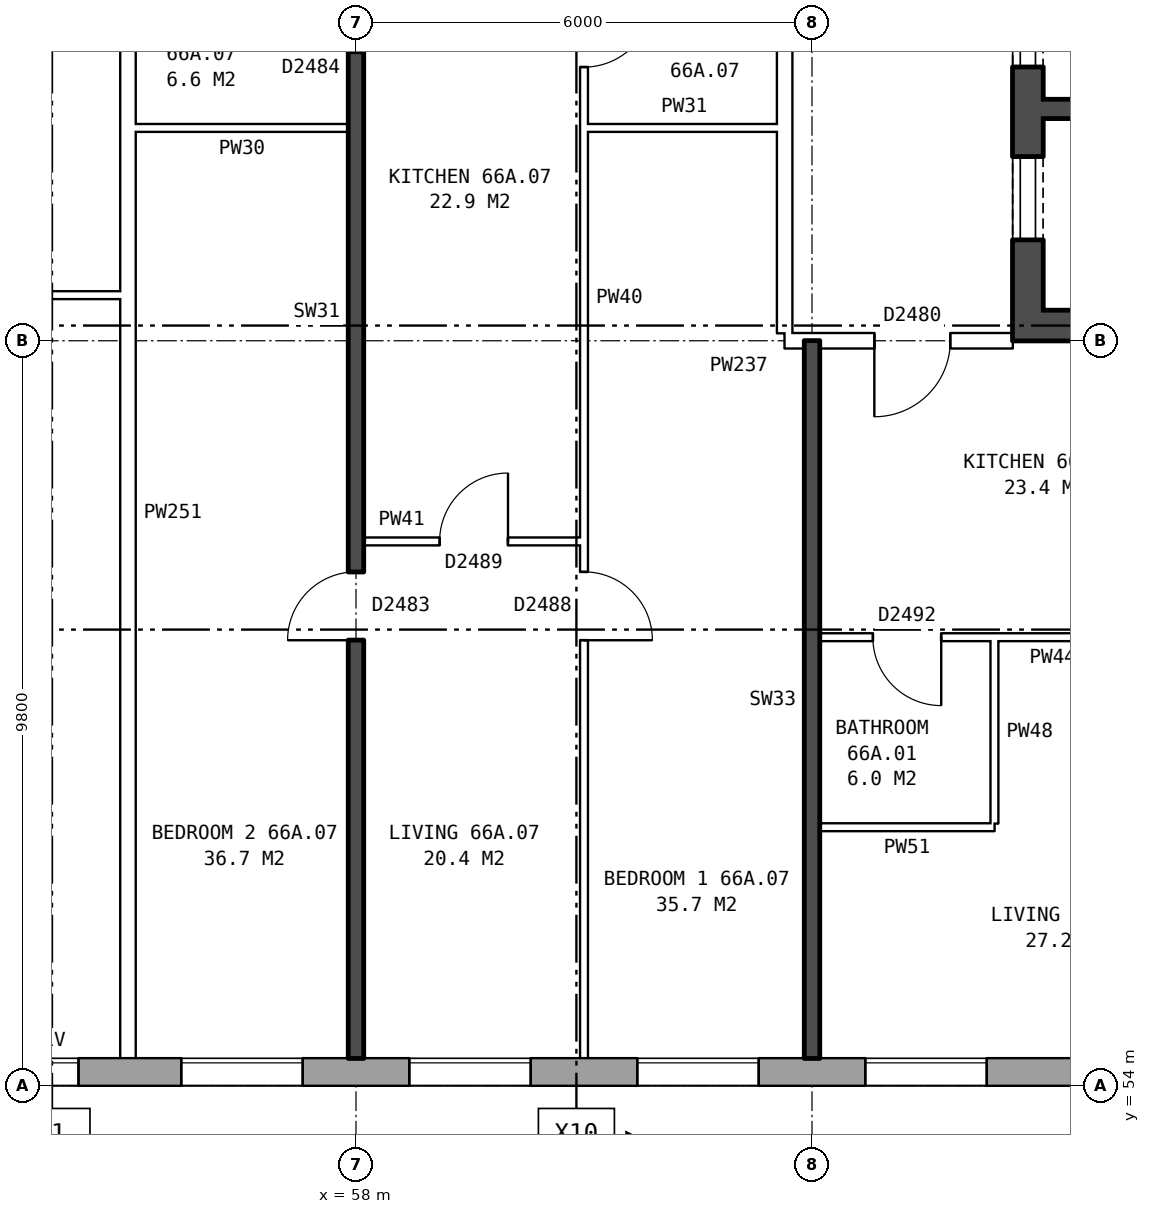
"""IFC4 building model, lengths in metres.
Left out: names, types, materials, properties, quantities, classifications, styles, units other than length and angle.
Written with IfcOpenShell. Run it as: python <this file> out.ifc"""

import sys

from ifc_helpers import new_model, si_unit, direction, frame, frame_2d, origin, place, context, subcontext, project, spatial, rectangle, extrude, element, fill, save


model = new_model("IFC4")
c1 = context("Model", 3, precision=1e-05, world=origin(), true_north=direction((0.0, 1.0)))
c2 = subcontext(c1, "Body", "Model", "MODEL_VIEW")
j1 = project(units=[si_unit("LENGTHUNIT", "METRE"), si_unit("PLANEANGLEUNIT", "RADIAN")], contexts=[c1])
p1 = place(None, origin())
s1 = spatial("IfcSite", under=j1, at=p1, CompositionType="ELEMENT")
p2 = place(p1, origin())
s2 = spatial("IfcBuilding", under=s1, at=p2, CompositionType="ELEMENT")
p3 = place(p2, frame((0.0, 0.0, 233.8)))
s3 = spatial("IfcBuildingStorey", under=s2, at=p3, CompositionType="ELEMENT", Elevation=233.8)
p4 = place(p3, frame((35.075, 54.18, 0.0), z_axis=(0.0, 0.0, 1.0), x_axis=(1.0, 0.0, 0.0)))
e1 = element("IfcWall", 1, at=p4, inside=s3, PredefinedType="STANDARD", context=c2, shape_type="SweptSolid", body=[
    extrude(rectangle(XDim=39.875, YDim=0.36, at=frame_2d((19.938, 0.0))), origin(), (0.0, 0.0, 1.0), 2.85),
])
p5 = place(p4, frame((2.625, 0.0, 0.8)))
e2 = element("IfcOpeningElement", 2, at=p5, cuts=e1, PredefinedType="OPENING", context=c2, shape_type="SweptSolid", body=[
    extrude(rectangle(XDim=1.6, YDim=1.8, at=frame_2d((0.8, 0.9))), frame((0.0, 0.19, 0.0), z_axis=(0.0, -1.0, 0.0), x_axis=(1.0, 0.0, 0.0)), (0.0, 0.0, 1.0), 0.38),
])
p6 = place(p4, frame((5.625, 0.0, 0.8)))
e3 = element("IfcOpeningElement", 3, at=p6, cuts=e1, PredefinedType="OPENING", context=c2, shape_type="SweptSolid", body=[
    extrude(rectangle(XDim=1.6, YDim=1.8, at=frame_2d((0.8, 0.9))), frame((0.0, 0.19, 0.0), z_axis=(0.0, -1.0, 0.0), x_axis=(1.0, 0.0, 0.0)), (0.0, 0.0, 1.0), 0.38),
])
p7 = place(p4, frame((8.625, 0.0, 0.8)))
e4 = element("IfcOpeningElement", 4, at=p7, cuts=e1, PredefinedType="OPENING", context=c2, shape_type="SweptSolid", body=[
    extrude(rectangle(XDim=1.6, YDim=1.8, at=frame_2d((0.8, 0.9))), frame((0.0, 0.19, 0.0), z_axis=(0.0, -1.0, 0.0), x_axis=(1.0, 0.0, 0.0)), (0.0, 0.0, 1.0), 0.38),
])
p8 = place(p4, frame((11.625, 0.0, 0.8)))
e5 = element("IfcOpeningElement", 5, at=p8, cuts=e1, PredefinedType="OPENING", context=c2, shape_type="SweptSolid", body=[
    extrude(rectangle(XDim=1.6, YDim=1.8, at=frame_2d((0.8, 0.9))), frame((0.0, 0.19, 0.0), z_axis=(0.0, -1.0, 0.0), x_axis=(1.0, 0.0, 0.0)), (0.0, 0.0, 1.0), 0.38),
])
p9 = place(p4, frame((14.625, 0.0, 0.8)))
e6 = element("IfcOpeningElement", 6, at=p9, cuts=e1, PredefinedType="OPENING", context=c2, shape_type="SweptSolid", body=[
    extrude(rectangle(XDim=1.6, YDim=1.8, at=frame_2d((0.8, 0.9))), frame((0.0, 0.19, 0.0), z_axis=(0.0, -1.0, 0.0), x_axis=(1.0, 0.0, 0.0)), (0.0, 0.0, 1.0), 0.38),
])
p10 = place(p4, frame((18.475, 0.0, 0.15)))
e7 = element("IfcOpeningElement", 7, at=p10, cuts=e1, PredefinedType="OPENING", context=c2, shape_type="SweptSolid", body=[
    extrude(rectangle(XDim=0.8, YDim=0.9, at=frame_2d((0.4, 0.45))), frame((0.0, 0.19, 0.0), z_axis=(0.0, -1.0, 0.0), x_axis=(1.0, 0.0, 0.0)), (0.0, 0.0, 1.0), 0.38),
])
p11 = place(p4, frame((20.625, 0.0, 0.8)))
e8 = element("IfcOpeningElement", 8, at=p11, cuts=e1, PredefinedType="OPENING", context=c2, shape_type="SweptSolid", body=[
    extrude(rectangle(XDim=1.6, YDim=1.8, at=frame_2d((0.8, 0.9))), frame((0.0, 0.19, 0.0), z_axis=(0.0, -1.0, 0.0), x_axis=(1.0, 0.0, 0.0)), (0.0, 0.0, 1.0), 0.38),
])
p12 = place(p4, frame((23.625, 0.0, 0.8)))
e9 = element("IfcOpeningElement", 9, at=p12, cuts=e1, PredefinedType="OPENING", context=c2, shape_type="SweptSolid", body=[
    extrude(rectangle(XDim=1.6, YDim=1.8, at=frame_2d((0.8, 0.9))), frame((0.0, 0.19, 0.0), z_axis=(0.0, -1.0, 0.0), x_axis=(1.0, 0.0, 0.0)), (0.0, 0.0, 1.0), 0.38),
])
p13 = place(p4, frame((26.625, 0.0, 0.8)))
e10 = element("IfcOpeningElement", 10, at=p13, cuts=e1, PredefinedType="OPENING", context=c2, shape_type="SweptSolid", body=[
    extrude(rectangle(XDim=1.6, YDim=1.8, at=frame_2d((0.8, 0.9))), frame((0.0, 0.19, 0.0), z_axis=(0.0, -1.0, 0.0), x_axis=(1.0, 0.0, 0.0)), (0.0, 0.0, 1.0), 0.38),
])
p14 = place(p4, frame((29.625, 0.0, 0.8)))
e11 = element("IfcOpeningElement", 11, at=p14, cuts=e1, PredefinedType="OPENING", context=c2, shape_type="SweptSolid", body=[
    extrude(rectangle(XDim=1.6, YDim=1.8, at=frame_2d((0.8, 0.9))), frame((0.0, 0.19, 0.0), z_axis=(0.0, -1.0, 0.0), x_axis=(1.0, 0.0, 0.0)), (0.0, 0.0, 1.0), 0.38),
])
p15 = place(p4, frame((32.625, 0.0, 0.8)))
e12 = element("IfcOpeningElement", 12, at=p15, cuts=e1, PredefinedType="OPENING", context=c2, shape_type="SweptSolid", body=[
    extrude(rectangle(XDim=1.6, YDim=1.8, at=frame_2d((0.8, 0.9))), frame((0.0, 0.19, 0.0), z_axis=(0.0, -1.0, 0.0), x_axis=(1.0, 0.0, 0.0)), (0.0, 0.0, 1.0), 0.38),
])
p16 = place(p4, frame((35.625, 0.0, 0.8)))
e13 = element("IfcOpeningElement", 13, at=p16, cuts=e1, PredefinedType="OPENING", context=c2, shape_type="SweptSolid", body=[
    extrude(rectangle(XDim=1.6, YDim=1.8, at=frame_2d((0.8, 0.9))), frame((0.0, 0.19, 0.0), z_axis=(0.0, -1.0, 0.0), x_axis=(1.0, 0.0, 0.0)), (0.0, 0.0, 1.0), 0.38),
])
p17 = place(p3, frame((66.84, 63.8, 0.0), z_axis=(0.0, 0.0, 1.0), x_axis=(0.0, 1.0, 0.0)))
e14 = element("IfcWall", 14, at=p17, inside=s3, PredefinedType="SHEAR", context=c2, shape_type="SweptSolid", body=[
    extrude(rectangle(XDim=12.4, YDim=0.4, at=frame_2d((6.2, 0.0))), origin(), (0.0, 0.0, 1.0), 2.85),
])
p18 = place(p17, frame((1.325, 0.0, 0.0)))
e15 = element("IfcOpeningElement", 15, at=p18, cuts=e14, PredefinedType="OPENING", context=c2, shape_type="SweptSolid", body=[
    extrude(rectangle(XDim=1.1, YDim=2.1, at=frame_2d((0.55, 1.05))), frame((0.0, 0.21, 0.0), z_axis=(0.0, -1.0, 0.0), x_axis=(1.0, 0.0, 0.0)), (0.0, 0.0, 1.0), 0.42),
])
p19 = place(p17, frame((3.6, 0.0, 0.0)))
e16 = element("IfcOpeningElement", 16, at=p19, cuts=e14, PredefinedType="OPENING", context=c2, shape_type="SweptSolid", body=[
    extrude(rectangle(XDim=1.1, YDim=2.1, at=frame_2d((0.55, 1.05))), frame((0.0, 0.21, 0.0), z_axis=(0.0, -1.0, 0.0), x_axis=(1.0, 0.0, 0.0)), (0.0, 0.0, 1.0), 0.42),
])
p20 = place(p17, frame((5.8, 0.0, 0.0)))
e17 = element("IfcOpeningElement", 17, at=p20, cuts=e14, PredefinedType="OPENING", context=c2, shape_type="SweptSolid", body=[
    extrude(rectangle(XDim=1.1, YDim=2.1, at=frame_2d((0.55, 1.05))), frame((0.0, 0.21, 0.0), z_axis=(0.0, -1.0, 0.0), x_axis=(1.0, 0.0, 0.0)), (0.0, 0.0, 1.0), 0.42),
])
p21 = place(p17, frame((8.0, 0.0, 0.0)))
e18 = element("IfcOpeningElement", 18, at=p21, cuts=e14, PredefinedType="OPENING", context=c2, shape_type="SweptSolid", body=[
    extrude(rectangle(XDim=1.1, YDim=2.1, at=frame_2d((0.55, 1.05))), frame((0.0, 0.21, 0.0), z_axis=(0.0, -1.0, 0.0), x_axis=(1.0, 0.0, 0.0)), (0.0, 0.0, 1.0), 0.42),
])
p22 = place(p17, frame((9.9, 0.0, 0.0)))
e19 = element("IfcOpeningElement", 19, at=p22, cuts=e14, PredefinedType="OPENING", context=c2, shape_type="SweptSolid", body=[
    extrude(rectangle(XDim=1.1, YDim=2.1, at=frame_2d((0.55, 1.05))), frame((0.0, 0.21, 0.0), z_axis=(0.0, -1.0, 0.0), x_axis=(1.0, 0.0, 0.0)), (0.0, 0.0, 1.0), 0.42),
])
p23 = place(p3, frame((67.04, 64.0, 0.0), z_axis=(0.0, 0.0, 1.0), x_axis=(1.0, 0.0, 0.0)))
e20 = element("IfcWall", 20, at=p23, inside=s3, PredefinedType="SHEAR", context=c2, shape_type="SweptSolid", body=[
    extrude(rectangle(XDim=8.2, YDim=0.4, at=frame_2d((4.1, 0.0))), origin(), (0.0, 0.0, 1.0), 2.85),
])
p24 = place(p3, frame((67.04, 66.85, 0.0), z_axis=(0.0, 0.0, 1.0), x_axis=(1.0, 0.0, 0.0)))
e21 = element("IfcWall", 21, at=p24, inside=s3, PredefinedType="SHEAR", context=c2, shape_type="SweptSolid", body=[
    extrude(rectangle(XDim=3.595, YDim=0.25, at=frame_2d((1.797, 0.0))), origin(), (0.0, 0.0, 1.0), 2.85),
])
p25 = place(p3, frame((63.64, 63.9, 0.0), z_axis=(0.0, 0.0, 1.0), x_axis=(0.0, 1.0, 0.0)))
e22 = element("IfcWall", 22, at=p25, inside=s3, PredefinedType="PARTITIONING", context=c2, shape_type="SweptSolid", body=[
    extrude(rectangle(XDim=12.2, YDim=0.2, at=frame_2d((6.1, 0.0))), origin(), (0.0, 0.0, 1.0), 2.85),
])
p26 = place(p25, frame((5.1, 0.0, 0.0)))
e23 = element("IfcOpeningElement", 23, at=p26, cuts=e22, PredefinedType="OPENING", context=c2, shape_type="SweptSolid", body=[
    extrude(rectangle(XDim=2.0, YDim=2.1, at=frame_2d((1.0, 1.05))), frame((0.0, 0.11, 0.0), z_axis=(0.0, -1.0, 0.0), x_axis=(1.0, 0.0, 0.0)), (0.0, 0.0, 1.0), 0.22),
])
p27 = place(p3, frame((64.1, 57.4, 0.0), z_axis=(0.0, 0.0, 1.0), x_axis=(1.0, 0.0, 0.0)))
e24 = element("IfcWall", 24, at=p27, inside=s3, PredefinedType="PARTITIONING", context=c2, shape_type="SweptSolid", body=[
    extrude(rectangle(XDim=2.3, YDim=0.1, at=frame_2d((1.15, 0.0))), origin(), (0.0, 0.0, 1.0), 2.85),
])
p28 = place(p3, frame((64.1, 59.9, 0.0), z_axis=(0.0, 0.0, 1.0), x_axis=(1.0, 0.0, 0.0)))
e25 = element("IfcWall", 25, at=p28, inside=s3, PredefinedType="PARTITIONING", context=c2, shape_type="SweptSolid", body=[
    extrude(rectangle(XDim=5.8, YDim=0.1, at=frame_2d((2.9, 0.0))), origin(), (0.0, 0.0, 1.0), 2.85),
])
p29 = place(p28, frame((3.6, 0.0, 0.0)))
e26 = element("IfcOpeningElement", 26, at=p29, cuts=e25, PredefinedType="OPENING", context=c2, shape_type="SweptSolid", body=[
    extrude(rectangle(XDim=0.9, YDim=2.1, at=frame_2d((0.45, 1.05))), frame((0.0, 0.06, 0.0), z_axis=(0.0, -1.0, 0.0), x_axis=(1.0, 0.0, 0.0)), (0.0, 0.0, 1.0), 0.12),
])
p30 = place(p28, frame((0.7, 0.0, 0.0)))
e27 = element("IfcOpeningElement", 27, at=p30, cuts=e25, PredefinedType="OPENING", context=c2, shape_type="SweptSolid", body=[
    extrude(rectangle(XDim=0.9, YDim=2.1, at=frame_2d((0.45, 1.05))), frame((0.0, 0.06, 0.0), z_axis=(0.0, -1.0, 0.0), x_axis=(1.0, 0.0, 0.0)), (0.0, 0.0, 1.0), 0.12),
])
p31 = place(p3, frame((58.1, 61.16, 0.0), z_axis=(0.0, 0.0, 1.0), x_axis=(1.0, 0.0, 0.0)))
e28 = element("IfcWall", 28, at=p31, inside=s3, PredefinedType="PARTITIONING", context=c2, shape_type="SweptSolid", body=[
    extrude(rectangle(XDim=2.9, YDim=0.1, at=frame_2d((1.45, 0.0))), origin(), (0.0, 0.0, 1.0), 2.85),
])
p32 = place(p31, frame((1.0, 0.0, 0.0)))
e29 = element("IfcOpeningElement", 29, at=p32, cuts=e28, PredefinedType="OPENING", context=c2, shape_type="SweptSolid", body=[
    extrude(rectangle(XDim=0.9, YDim=2.1, at=frame_2d((0.45, 1.05))), frame((0.0, 0.06, 0.0), z_axis=(0.0, -1.0, 0.0), x_axis=(1.0, 0.0, 0.0)), (0.0, 0.0, 1.0), 0.12),
])
p33 = place(p3, frame((63.64, 63.8, 0.0), z_axis=(0.0, 0.0, 1.0), x_axis=(1.0, 0.0, 0.0)))
e30 = element("IfcWall", 30, at=p33, inside=s3, PredefinedType="PARTITIONING", context=c2, shape_type="SweptSolid", body=[
    extrude(rectangle(XDim=3.0, YDim=0.2, at=frame_2d((1.5, 0.0))), origin(), (0.0, 0.0, 1.0), 2.85),
])
p34 = place(p33, frame((1.18, 0.0, 0.0)))
e31 = element("IfcOpeningElement", 31, at=p34, cuts=e30, PredefinedType="OPENING", context=c2, shape_type="SweptSolid", body=[
    extrude(rectangle(XDim=1.0, YDim=2.1, at=frame_2d((0.5, 1.05))), frame((0.0, 0.11, 0.0), z_axis=(0.0, -1.0, 0.0), x_axis=(1.0, 0.0, 0.0)), (0.0, 0.0, 1.0), 0.22),
])
for number, where, z_axis, x_axis in (
    (32, (52.1, 64.4, 0.0), (0.0, 0.0, 1.0), (1.0, 0.0, 0.0)),
    (33, (55.1, 66.6, 0.0), (0.0, 0.0, 1.0), (1.0, 0.0, 0.0)),
):
    element("IfcWall", number, at=place(p3, frame(where, z_axis=z_axis, x_axis=x_axis)), inside=s3, PredefinedType="PARTITIONING", context=c2, shape_type="SweptSolid", body=[
        extrude(rectangle(XDim=2.8, YDim=0.1, at=frame_2d((1.4, 0.0))), origin(), (0.0, 0.0, 1.0), 2.85),
    ])
p35 = place(p3, frame((61.0, 66.6, 0.0), z_axis=(0.0, 0.0, 1.0), x_axis=(1.0, 0.0, 0.0)))
e34 = element("IfcWall", 34, at=p35, inside=s3, PredefinedType="PARTITIONING", context=c2, shape_type="SweptSolid", body=[
    extrude(rectangle(XDim=2.64, YDim=0.1, at=frame_2d((1.32, 0.0))), origin(), (0.0, 0.0, 1.0), 2.85),
])
p36 = place(p3, frame((55.0, 54.36, 0.0), z_axis=(0.0, 0.0, 1.0), x_axis=(0.0, 1.0, 0.0)))
e35 = element("IfcWall", 35, at=p36, inside=s3, PredefinedType="PARTITIONING", context=c2, shape_type="SweptSolid", body=[
    extrude(rectangle(XDim=14.34, YDim=0.2, at=frame_2d((7.17, 0.0))), origin(), (0.0, 0.0, 1.0), 2.85),
])
p37 = place(p3, frame((58.0, 54.36, 0.0), z_axis=(0.0, 0.0, 1.0), x_axis=(0.0, 1.0, 0.0)))
e36 = element("IfcWall", 36, at=p37, inside=s3, PredefinedType="SOLIDWALL", context=c2, shape_type="SweptSolid", body=[
    extrude(rectangle(XDim=14.44, YDim=0.2, at=frame_2d((7.22, 0.0))), origin(), (0.0, 0.0, 1.0), 2.85),
])
p38 = place(p37, frame((5.5, 0.0, 0.0)))
e37 = element("IfcOpeningElement", 37, at=p38, cuts=e36, PredefinedType="OPENING", context=c2, shape_type="SweptSolid", body=[
    extrude(rectangle(XDim=0.9, YDim=2.1, at=frame_2d((0.45, 1.05))), frame((0.0, 0.11, 0.0), z_axis=(0.0, -1.0, 0.0), x_axis=(1.0, 0.0, 0.0)), (0.0, 0.0, 1.0), 0.22),
])
p39 = place(p37, frame((13.24, 0.0, 0.0)))
e38 = element("IfcOpeningElement", 38, at=p39, cuts=e36, PredefinedType="OPENING", context=c2, shape_type="SweptSolid", body=[
    extrude(rectangle(XDim=0.8, YDim=2.1, at=frame_2d((0.4, 1.05))), frame((0.0, 0.11, 0.0), z_axis=(0.0, -1.0, 0.0), x_axis=(1.0, 0.0, 0.0)), (0.0, 0.0, 1.0), 0.22),
])
p40 = place(p3, frame((61.0, 54.36, 0.0), z_axis=(0.0, 0.0, 1.0), x_axis=(0.0, 1.0, 0.0)))
e39 = element("IfcWall", 39, at=p40, inside=s3, PredefinedType="PARTITIONING", context=c2, shape_type="SweptSolid", body=[
    extrude(rectangle(XDim=14.34, YDim=0.1, at=frame_2d((7.17, 0.0))), origin(), (0.0, 0.0, 1.0), 2.85),
])
p41 = place(p40, frame((5.5, 0.0, 0.0)))
e40 = element("IfcOpeningElement", 40, at=p41, cuts=e39, PredefinedType="OPENING", context=c2, shape_type="SweptSolid", body=[
    extrude(rectangle(XDim=0.9, YDim=2.1, at=frame_2d((0.45, 1.05))), frame((0.0, 0.06, 0.0), z_axis=(0.0, -1.0, 0.0), x_axis=(1.0, 0.0, 0.0)), (0.0, 0.0, 1.0), 0.12),
])
p42 = place(p40, frame((13.04, 0.0, 0.0)))
e41 = element("IfcOpeningElement", 41, at=p42, cuts=e39, PredefinedType="OPENING", context=c2, shape_type="SweptSolid", body=[
    extrude(rectangle(XDim=0.9, YDim=2.1, at=frame_2d((0.45, 1.05))), frame((0.0, 0.06, 0.0), z_axis=(0.0, -1.0, 0.0), x_axis=(1.0, 0.0, 0.0)), (0.0, 0.0, 1.0), 0.12),
])
p43 = place(p3, frame((64.0, 54.36, 0.0), z_axis=(0.0, 0.0, 1.0), x_axis=(0.0, 1.0, 0.0)))
e42 = element("IfcWall", 42, at=p43, inside=s3, PredefinedType="SOLIDWALL", context=c2, shape_type="SweptSolid", body=[
    extrude(rectangle(XDim=9.44, YDim=0.2, at=frame_2d((4.72, 0.0))), origin(), (0.0, 0.0, 1.0), 2.85),
])
p44 = place(p3, frame((66.4, 57.45, 0.0), z_axis=(0.0, 0.0, 1.0), x_axis=(0.0, 1.0, 0.0)))
e43 = element("IfcWall", 43, at=p44, inside=s3, PredefinedType="PARTITIONING", context=c2, shape_type="SweptSolid", body=[
    extrude(rectangle(XDim=2.4, YDim=0.1, at=frame_2d((1.2, 0.0))), origin(), (0.0, 0.0, 1.0), 2.85),
])
p45 = place(p10, origin())
e44 = element("IfcWindow", 44, at=p45, inside=s3, PartitioningType="SINGLE_PANEL", PredefinedType="WINDOW", context=c2, shape_type="SweptSolid", body=[
    extrude(rectangle(XDim=0.8, YDim=0.9, at=frame_2d((0.4, 0.45))), frame((0.0, 0.15, 0.0), z_axis=(0.0, -1.0, 0.0), x_axis=(1.0, 0.0, 0.0)), (0.0, 0.0, 1.0), 0.06),
])
fill(e7, e44)
p46 = place(p11, origin())
e45 = element("IfcWindow", 45, at=p46, inside=s3, PartitioningType="SINGLE_PANEL", PredefinedType="WINDOW", context=c2, shape_type="SweptSolid", body=[
    extrude(rectangle(XDim=1.6, YDim=1.8, at=frame_2d((0.8, 0.9))), frame((0.0, 0.15, 0.0), z_axis=(0.0, -1.0, 0.0), x_axis=(1.0, 0.0, 0.0)), (0.0, 0.0, 1.0), 0.06),
])
fill(e8, e45)
p47 = place(p12, origin())
e46 = element("IfcWindow", 46, at=p47, inside=s3, PartitioningType="SINGLE_PANEL", PredefinedType="WINDOW", context=c2, shape_type="SweptSolid", body=[
    extrude(rectangle(XDim=1.6, YDim=1.8, at=frame_2d((0.8, 0.9))), frame((0.0, 0.15, 0.0), z_axis=(0.0, -1.0, 0.0), x_axis=(1.0, 0.0, 0.0)), (0.0, 0.0, 1.0), 0.06),
])
fill(e9, e46)
p48 = place(p13, origin())
e47 = element("IfcWindow", 47, at=p48, inside=s3, PartitioningType="SINGLE_PANEL", PredefinedType="WINDOW", context=c2, shape_type="SweptSolid", body=[
    extrude(rectangle(XDim=1.6, YDim=1.8, at=frame_2d((0.8, 0.9))), frame((0.0, 0.15, 0.0), z_axis=(0.0, -1.0, 0.0), x_axis=(1.0, 0.0, 0.0)), (0.0, 0.0, 1.0), 0.06),
])
fill(e10, e47)
p49 = place(p14, origin())
e48 = element("IfcWindow", 48, at=p49, inside=s3, PartitioningType="SINGLE_PANEL", PredefinedType="WINDOW", context=c2, shape_type="SweptSolid", body=[
    extrude(rectangle(XDim=1.6, YDim=1.8, at=frame_2d((0.8, 0.9))), frame((0.0, 0.15, 0.0), z_axis=(0.0, -1.0, 0.0), x_axis=(1.0, 0.0, 0.0)), (0.0, 0.0, 1.0), 0.06),
])
fill(e11, e48)
p50 = place(p18, origin())
e49 = element("IfcDoor", 49, at=p50, inside=s3, OperationType="DOUBLE_DOOR_SLIDING", PredefinedType="DOOR", context=c2, shape_type="SweptSolid", body=[
    extrude(rectangle(XDim=1.1, YDim=2.1, at=frame_2d((0.55, 1.05))), frame((0.0, -0.135, 0.0), z_axis=(0.0, -1.0, 0.0), x_axis=(1.0, 0.0, 0.0)), (0.0, 0.0, 1.0), 0.05),
])
fill(e15, e49)
p51 = place(p19, origin())
e50 = element("IfcDoor", 50, at=p51, inside=s3, OperationType="DOUBLE_DOOR_SLIDING", PredefinedType="DOOR", context=c2, shape_type="SweptSolid", body=[
    extrude(rectangle(XDim=1.1, YDim=2.1, at=frame_2d((0.55, 1.05))), frame((0.0, -0.135, 0.0), z_axis=(0.0, -1.0, 0.0), x_axis=(1.0, 0.0, 0.0)), (0.0, 0.0, 1.0), 0.05),
])
fill(e16, e50)
p52 = place(p34, frame((1.0, 0.0, 0.0), z_axis=(0.0, 0.0, 1.0), x_axis=(-1.0, 0.0, 0.0)))
e51 = element("IfcDoor", 51, at=p52, inside=s3, OperationType="SINGLE_SWING_RIGHT", PredefinedType="DOOR", context=c2, shape_type="SweptSolid", body=[
    extrude(rectangle(XDim=1.0, YDim=2.1, at=frame_2d((0.5, 1.05))), frame((0.0, 0.025, 0.0), z_axis=(0.0, -1.0, 0.0), x_axis=(1.0, 0.0, 0.0)), (0.0, 0.0, 1.0), 0.05),
])
fill(e31, e51)
p53 = place(p30, frame((0.9, 0.0, 0.0), z_axis=(0.0, 0.0, 1.0), x_axis=(-1.0, 0.0, 0.0)))
e52 = element("IfcDoor", 52, at=p53, inside=s3, OperationType="SINGLE_SWING_LEFT", PredefinedType="DOOR", context=c2, shape_type="SweptSolid", body=[
    extrude(rectangle(XDim=0.9, YDim=2.1, at=frame_2d((0.45, 1.05))), frame((0.0, 0.025, 0.0), z_axis=(0.0, -1.0, 0.0), x_axis=(1.0, 0.0, 0.0)), (0.0, 0.0, 1.0), 0.05),
])
fill(e27, e52)
p54 = place(p41, frame((0.9, 0.0, 0.0), z_axis=(0.0, 0.0, 1.0), x_axis=(-1.0, 0.0, 0.0)))
e53 = element("IfcDoor", 53, at=p54, inside=s3, OperationType="SINGLE_SWING_RIGHT", PredefinedType="DOOR", context=c2, shape_type="SweptSolid", body=[
    extrude(rectangle(XDim=0.9, YDim=2.1, at=frame_2d((0.45, 1.05))), frame((0.0, 0.025, 0.0), z_axis=(0.0, -1.0, 0.0), x_axis=(1.0, 0.0, 0.0)), (0.0, 0.0, 1.0), 0.05),
])
fill(e40, e53)
p55 = place(p38, origin())
e54 = element("IfcDoor", 54, at=p55, inside=s3, OperationType="SINGLE_SWING_LEFT", PredefinedType="DOOR", context=c2, shape_type="SweptSolid", body=[
    extrude(rectangle(XDim=0.9, YDim=2.1, at=frame_2d((0.45, 1.05))), frame((0.0, 0.025, 0.0), z_axis=(0.0, -1.0, 0.0), x_axis=(1.0, 0.0, 0.0)), (0.0, 0.0, 1.0), 0.05),
])
fill(e37, e54)
p56 = place(p32, origin())
e55 = element("IfcDoor", 55, at=p56, inside=s3, OperationType="SINGLE_SWING_RIGHT", PredefinedType="DOOR", context=c2, shape_type="SweptSolid", body=[
    extrude(rectangle(XDim=0.9, YDim=2.1, at=frame_2d((0.45, 1.05))), frame((0.0, 0.025, 0.0), z_axis=(0.0, -1.0, 0.0), x_axis=(1.0, 0.0, 0.0)), (0.0, 0.0, 1.0), 0.05),
])
fill(e29, e55)
p57 = place(p42, frame((0.9, 0.0, 0.0), z_axis=(0.0, 0.0, 1.0), x_axis=(-1.0, 0.0, 0.0)))
e56 = element("IfcDoor", 56, at=p57, inside=s3, OperationType="SINGLE_SWING_LEFT", PredefinedType="DOOR", context=c2, shape_type="SweptSolid", body=[
    extrude(rectangle(XDim=0.9, YDim=2.1, at=frame_2d((0.45, 1.05))), frame((0.0, 0.025, 0.0), z_axis=(0.0, -1.0, 0.0), x_axis=(1.0, 0.0, 0.0)), (0.0, 0.0, 1.0), 0.05),
])
fill(e41, e56)
p58 = place(p39, origin())
e57 = element("IfcDoor", 57, at=p58, inside=s3, OperationType="SINGLE_SWING_RIGHT", PredefinedType="DOOR", context=c2, shape_type="SweptSolid", body=[
    extrude(rectangle(XDim=0.8, YDim=2.1, at=frame_2d((0.4, 1.05))), frame((0.0, 0.025, 0.0), z_axis=(0.0, -1.0, 0.0), x_axis=(1.0, 0.0, 0.0)), (0.0, 0.0, 1.0), 0.05),
])
fill(e38, e57)
save(model, sys.argv[1])
